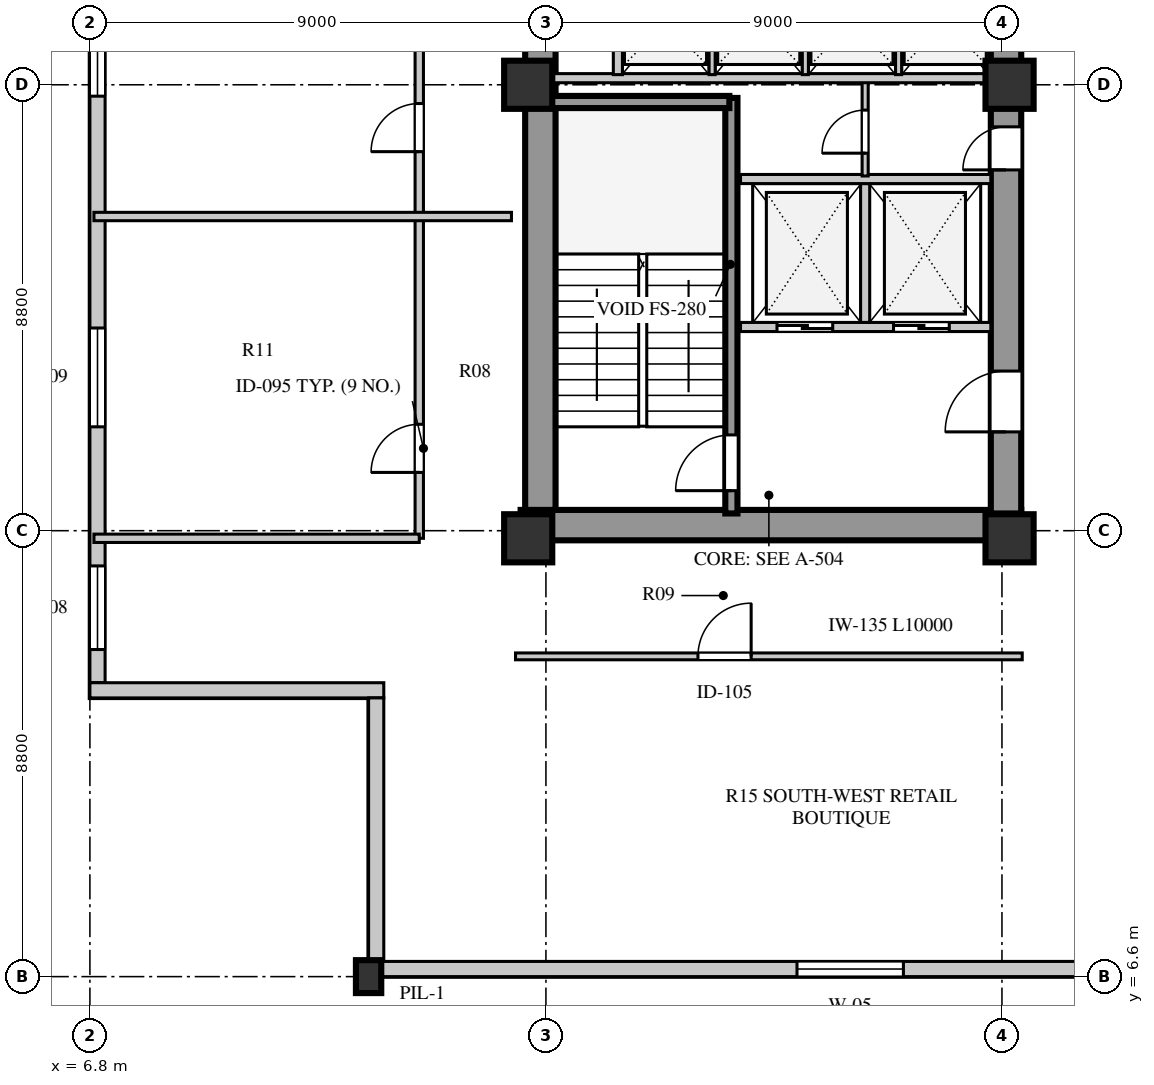
"""IFC4 building model, lengths in metres.
Left out: names, types, materials, properties, quantities, classifications, styles, units other than length and angle.
Written with IfcOpenShell. Run it as: python <this file> out.ifc"""

import sys

from ifc_helpers import new_model, si_unit, direction, frame, frame_2d, origin, origin_2d, place, context, subcontext, project, spatial, rectangle, extrude, element, fill, save


model = new_model("IFC4")
c1 = context("Model", 3, precision=1e-05, world=origin(), true_north=direction((0.0, 1.0)))
c2 = subcontext(c1, "Body", "Model", "MODEL_VIEW")
j1 = project(units=[si_unit("LENGTHUNIT", "METRE"), si_unit("PLANEANGLEUNIT", "RADIAN")], contexts=[c1])
p1 = place(None, origin())
s1 = spatial("IfcSite", under=j1, at=p1, CompositionType="ELEMENT")
p2 = place(p1, origin())
s2 = spatial("IfcBuilding", under=s1, at=p2, CompositionType="ELEMENT")
p3 = place(p2, frame((0.0, 0.0, 21.5)))
s3 = spatial("IfcBuildingStorey", under=s2, at=p3, CompositionType="ELEMENT", Elevation=21.5)
p4 = place(p3, frame((15.3, 15.51, 0.0), z_axis=(0.0, 0.0, 1.0), x_axis=(1.0, 0.0, 0.0)))
e1 = element("IfcWall", 1, at=p4, inside=s3, PredefinedType="SHEAR", context=c2, shape_type="SweptSolid", body=[
    extrude(rectangle(XDim=9.88, YDim=0.6, at=frame_2d((4.94, 0.0))), origin(), (0.0, 0.0, 1.0), 4.22),
])
p5 = place(p3, frame((15.69, 15.81, 0.0), z_axis=(0.0, 0.0, 1.0), x_axis=(0.0, 1.0, 0.0)))
e2 = element("IfcWall", 2, at=p5, inside=s3, PredefinedType="SHEAR", context=c2, shape_type="SweptSolid", body=[
    extrude(rectangle(XDim=25.63, YDim=0.6, at=frame_2d((12.815, 0.0))), origin(), (0.0, 0.0, 1.0), 4.22),
])
p6 = place(p3, frame((24.88, 15.74, 0.0), z_axis=(0.0, 0.0, 1.0), x_axis=(0.0, 1.0, 0.0)))
e3 = element("IfcWall", 3, at=p6, inside=s3, PredefinedType="SHEAR", context=c2, shape_type="SweptSolid", body=[
    extrude(rectangle(XDim=25.76, YDim=0.6, at=frame_2d((12.88, 0.0))), origin(), (0.0, 0.0, 1.0), 4.22),
])
p7 = place(p6, frame((1.61, 0.0, 0.0)))
e4 = element("IfcOpeningElement", 4, at=p7, cuts=e3, PredefinedType="OPENING", context=c2, shape_type="SweptSolid", body=[
    extrude(rectangle(XDim=1.2, YDim=2.1, at=frame_2d((0.6, 1.05))), frame((0.0, 0.31, 0.0), z_axis=(0.0, -1.0, 0.0), x_axis=(1.0, 0.0, 0.0)), (0.0, 0.0, 1.0), 0.62),
])
p8 = place(p6, frame((6.78, 0.0, 0.0)))
e5 = element("IfcOpeningElement", 5, at=p8, cuts=e3, PredefinedType="OPENING", context=c2, shape_type="SweptSolid", body=[
    extrude(rectangle(XDim=0.85, YDim=2.06, at=frame_2d((0.425, 1.03))), frame((0.0, 0.31, 0.0), z_axis=(0.0, -1.0, 0.0), x_axis=(1.0, 0.0, 0.0)), (0.0, 0.0, 1.0), 0.62),
])
p9 = place(p6, frame((12.11, 0.0, 0.0)))
e6 = element("IfcOpeningElement", 6, at=p9, cuts=e3, PredefinedType="OPENING", context=c2, shape_type="SweptSolid", body=[
    extrude(rectangle(XDim=1.5, YDim=2.12, at=frame_2d((0.75, 1.06))), frame((0.0, 0.31, 0.0), z_axis=(0.0, -1.0, 0.0), x_axis=(1.0, 0.0, 0.0)), (0.0, 0.0, 1.0), 0.62),
])
p10 = place(p6, frame((20.11, 0.0, 0.0)))
e7 = element("IfcOpeningElement", 7, at=p10, cuts=e3, PredefinedType="OPENING", context=c2, shape_type="SweptSolid", body=[
    extrude(rectangle(XDim=1.2, YDim=2.12, at=frame_2d((0.6, 1.06))), frame((0.0, 0.31, 0.0), z_axis=(0.0, -1.0, 0.0), x_axis=(1.0, 0.0, 0.0)), (0.0, 0.0, 1.0), 0.62),
])
p11 = place(p6, frame((24.01, 0.0, 0.0)))
e8 = element("IfcOpeningElement", 8, at=p11, cuts=e3, PredefinedType="OPENING", context=c2, shape_type="SweptSolid", body=[
    extrude(rectangle(XDim=0.95, YDim=2.1, at=frame_2d((0.475, 1.05))), frame((0.0, 0.31, 0.0), z_axis=(0.0, -1.0, 0.0), x_axis=(1.0, 0.0, 0.0)), (0.0, 0.0, 1.0), 0.62),
])
for number, where, z_axis, x_axis in (
    (9, (15.45, 15.25, 0.0), (0.0, 0.0, 1.0), (1.0, 0.0, 0.0)),
    (10, (15.45, 24.2, 0.0), (0.0, 0.0, 1.0), (1.0, 0.0, 0.0)),
    (11, (24.95, 15.25, 0.0), (0.0, 0.0, 1.0), (1.0, 0.0, 0.0)),
    (12, (24.95, 24.2, 0.0), (0.0, 0.0, 1.0), (1.0, 0.0, 0.0)),
):
    element("IfcColumn", number, at=place(p3, frame(where, z_axis=z_axis, x_axis=x_axis)), inside=s3, PredefinedType="COLUMN", context=c2, shape_type="SweptSolid", body=[
        extrude(rectangle(XDim=0.95, YDim=0.95, at=origin_2d()), origin(), (0.0, 0.0, 1.0), 4.22),
    ])
p12 = place(p3, frame((12.3, 6.6, 0.0), z_axis=(0.0, 0.0, 1.0), x_axis=(1.0, 0.0, 0.0)))
e13 = element("IfcColumn", 13, at=p12, inside=s3, PredefinedType="PILASTER", context=c2, shape_type="SweptSolid", body=[
    extrude(rectangle(XDim=0.5, YDim=0.65, at=origin_2d()), origin(), (0.0, 0.0, 1.0), 4.22),
])
p13 = place(p3, frame((12.3, 6.75, 0.0), z_axis=(0.0, 0.0, 1.0), x_axis=(1.0, 0.0, 0.0)))
e14 = element("IfcWall", 14, at=p13, inside=s3, PredefinedType="STANDARD", context=c2, shape_type="SweptSolid", body=[
    extrude(rectangle(XDim=34.0, YDim=0.3, at=frame_2d((17.0, 0.0))), origin(), (0.0, 0.0, 1.0), 4.22),
])
p14 = place(p13, frame((8.455, 0.0, 0.8)))
e15 = element("IfcOpeningElement", 15, at=p14, cuts=e14, PredefinedType="OPENING", context=c2, shape_type="SweptSolid", body=[
    extrude(rectangle(XDim=2.1, YDim=1.95, at=frame_2d((1.05, 0.975))), frame((0.0, 0.16, 0.0), z_axis=(0.0, -1.0, 0.0), x_axis=(1.0, 0.0, 0.0)), (0.0, 0.0, 1.0), 0.32),
])
p15 = place(p13, frame((25.72, 0.0, 0.8)))
e16 = element("IfcOpeningElement", 16, at=p15, cuts=e14, PredefinedType="OPENING", context=c2, shape_type="SweptSolid", body=[
    extrude(rectangle(XDim=1.35, YDim=1.9, at=frame_2d((0.675, 0.95))), frame((0.0, 0.16, 0.0), z_axis=(0.0, -1.0, 0.0), x_axis=(1.0, 0.0, 0.0)), (0.0, 0.0, 1.0), 0.32),
])
p16 = place(p3, frame((6.95, 44.8, 0.0), z_axis=(0.0, 0.0, 1.0), x_axis=(0.0, -1.0, 0.0)))
e17 = element("IfcWall", 17, at=p16, inside=s3, PredefinedType="STANDARD", context=c2, shape_type="SweptSolid", body=[
    extrude(rectangle(XDim=32.4, YDim=0.3, at=frame_2d((16.2, 0.0))), origin(), (0.0, 0.0, 1.0), 4.22),
])
p17 = place(p16, frame((30.095, 0.0, 0.8)))
e18 = element("IfcOpeningElement", 18, at=p17, cuts=e17, PredefinedType="OPENING", context=c2, shape_type="SweptSolid", body=[
    extrude(rectangle(XDim=1.65, YDim=1.95, at=frame_2d((0.825, 0.975))), frame((0.0, 0.16, 0.0), z_axis=(0.0, -1.0, 0.0), x_axis=(1.0, 0.0, 0.0)), (0.0, 0.0, 1.0), 0.32),
])
p18 = place(p16, frame((25.4, 0.0, 0.8)))
e19 = element("IfcOpeningElement", 19, at=p18, cuts=e17, PredefinedType="OPENING", context=c2, shape_type="SweptSolid", body=[
    extrude(rectangle(XDim=1.95, YDim=2.0, at=frame_2d((0.975, 1.0))), frame((0.0, 0.16, 0.0), z_axis=(0.0, -1.0, 0.0), x_axis=(1.0, 0.0, 0.0)), (0.0, 0.0, 1.0), 0.32),
])
p19 = place(p16, frame((18.575, 0.0, 0.8)))
e20 = element("IfcOpeningElement", 20, at=p19, cuts=e17, PredefinedType="OPENING", context=c2, shape_type="SweptSolid", body=[
    extrude(rectangle(XDim=2.25, YDim=2.0, at=frame_2d((1.125, 1.0))), frame((0.0, 0.16, 0.0), z_axis=(0.0, -1.0, 0.0), x_axis=(1.0, 0.0, 0.0)), (0.0, 0.0, 1.0), 0.32),
])
p20 = place(p16, frame((11.8, 0.0, 0.8)))
e21 = element("IfcOpeningElement", 21, at=p20, cuts=e17, PredefinedType="OPENING", context=c2, shape_type="SweptSolid", body=[
    extrude(rectangle(XDim=1.8, YDim=2.0, at=frame_2d((0.9, 1.0))), frame((0.0, 0.16, 0.0), z_axis=(0.0, -1.0, 0.0), x_axis=(1.0, 0.0, 0.0)), (0.0, 0.0, 1.0), 0.32),
])
p21 = place(p16, frame((5.275, 0.0, 0.8)))
e22 = element("IfcOpeningElement", 22, at=p21, cuts=e17, PredefinedType="OPENING", context=c2, shape_type="SweptSolid", body=[
    extrude(rectangle(XDim=1.5, YDim=2.0, at=frame_2d((0.75, 1.0))), frame((0.0, 0.16, 0.0), z_axis=(0.0, -1.0, 0.0), x_axis=(1.0, 0.0, 0.0)), (0.0, 0.0, 1.0), 0.32),
])
p22 = place(p16, frame((0.88, 0.0, 0.8)))
e23 = element("IfcOpeningElement", 23, at=p22, cuts=e17, PredefinedType="OPENING", context=c2, shape_type="SweptSolid", body=[
    extrude(rectangle(XDim=1.2, YDim=1.75, at=frame_2d((0.6, 0.875))), frame((0.0, 0.16, 0.0), z_axis=(0.0, -1.0, 0.0), x_axis=(1.0, 0.0, 0.0)), (0.0, 0.0, 1.0), 0.32),
])
p23 = place(p3, frame((6.8, 12.25, 0.0), z_axis=(0.0, 0.0, 1.0), x_axis=(1.0, 0.0, 0.0)))
e24 = element("IfcWall", 24, at=p23, inside=s3, PredefinedType="STANDARD", context=c2, shape_type="SweptSolid", body=[
    extrude(rectangle(XDim=5.8, YDim=0.3, at=frame_2d((2.9, 0.0))), origin(), (0.0, 0.0, 1.0), 4.22),
])
p24 = place(p3, frame((12.45, 12.1, 0.0), z_axis=(0.0, 0.0, 1.0), x_axis=(0.0, -1.0, 0.0)))
e25 = element("IfcWall", 25, at=p24, inside=s3, PredefinedType="STANDARD", context=c2, shape_type="SweptSolid", body=[
    extrude(rectangle(XDim=5.2, YDim=0.3, at=frame_2d((2.6, 0.0))), origin(), (0.0, 0.0, 1.0), 4.22),
])
p25 = place(p3, frame((19.46, 15.74, 0.0), z_axis=(0.0, 0.0, 1.0), x_axis=(0.0, 1.0, 0.0)))
e26 = element("IfcWall", 26, at=p25, inside=s3, PredefinedType="SHEAR", context=c2, shape_type="SweptSolid", body=[
    extrude(rectangle(XDim=8.2, YDim=0.24, at=frame_2d((4.1, 0.0))), origin(), (0.0, 0.0, 1.0), 4.5),
])
p26 = place(p25, frame((0.45, 0.0, 0.0)))
e27 = element("IfcOpeningElement", 27, at=p26, cuts=e26, PredefinedType="OPENING", context=c2, shape_type="SweptSolid", body=[
    extrude(rectangle(XDim=1.1, YDim=2.1, at=frame_2d((0.55, 1.05))), frame((0.0, 0.13, 0.0), z_axis=(0.0, -1.0, 0.0), x_axis=(1.0, 0.0, 0.0)), (0.0, 0.0, 1.0), 0.26),
])
p27 = place(p3, frame((15.9, 23.86, 0.0), z_axis=(0.0, 0.0, 1.0), x_axis=(1.0, 0.0, 0.0)))
e28 = element("IfcWall", 28, at=p27, inside=s3, PredefinedType="SHEAR", context=c2, shape_type="SweptSolid", body=[
    extrude(rectangle(XDim=3.52, YDim=0.24, at=frame_2d((1.76, 0.0))), origin(), (0.0, 0.0, 1.0), 4.5),
])
p28 = place(p3, frame((19.64, 19.42, 0.0), z_axis=(0.0, 0.0, 1.0), x_axis=(1.0, 0.0, 0.0)))
e29 = element("IfcWall", 29, at=p28, inside=s3, PredefinedType="SOLIDWALL", context=c2, shape_type="SweptSolid", body=[
    extrude(rectangle(XDim=4.94, YDim=0.18, at=frame_2d((2.47, 0.0))), origin(), (0.0, 0.0, 1.0), 4.22),
])
p29 = place(p28, frame((0.72, 0.0, 0.0)))
e30 = element("IfcOpeningElement", 30, at=p29, cuts=e29, PredefinedType="OPENING", context=c2, shape_type="SweptSolid", body=[
    extrude(rectangle(XDim=1.1, YDim=2.1, at=frame_2d((0.55, 1.05))), frame((0.0, 0.1, 0.0), z_axis=(0.0, -1.0, 0.0), x_axis=(1.0, 0.0, 0.0)), (0.0, 0.0, 1.0), 0.2),
])
p30 = place(p28, frame((3.02, 0.0, 0.0)))
e31 = element("IfcOpeningElement", 31, at=p30, cuts=e29, PredefinedType="OPENING", context=c2, shape_type="SweptSolid", body=[
    extrude(rectangle(XDim=1.1, YDim=2.1, at=frame_2d((0.55, 1.05))), frame((0.0, 0.1, 0.0), z_axis=(0.0, -1.0, 0.0), x_axis=(1.0, 0.0, 0.0)), (0.0, 0.0, 1.0), 0.2),
])
p31 = place(p3, frame((22.1, 19.51, 0.0), z_axis=(0.0, 0.0, 1.0), x_axis=(0.0, 1.0, 0.0)))
e32 = element("IfcWall", 32, at=p31, inside=s3, PredefinedType="SOLIDWALL", context=c2, shape_type="SweptSolid", body=[
    extrude(rectangle(XDim=2.74, YDim=0.18, at=frame_2d((1.37, 0.0))), origin(), (0.0, 0.0, 1.0), 4.22),
])
p32 = place(p3, frame((19.64, 22.34, 0.0), z_axis=(0.0, 0.0, 1.0), x_axis=(1.0, 0.0, 0.0)))
e33 = element("IfcWall", 33, at=p32, inside=s3, PredefinedType="SOLIDWALL", context=c2, shape_type="SweptSolid", body=[
    extrude(rectangle(XDim=4.94, YDim=0.18, at=frame_2d((2.47, 0.0))), origin(), (0.0, 0.0, 1.0), 4.22),
])
p33 = place(p3, frame((22.1, 22.4, 0.0), z_axis=(0.0, 0.0, 1.0), x_axis=(0.0, 1.0, 0.0)))
e34 = element("IfcWall", 34, at=p33, inside=s3, PredefinedType="PARTITIONING", context=c2, shape_type="SweptSolid", body=[
    extrude(rectangle(XDim=1.88, YDim=0.12, at=frame_2d((0.94, 0.0))), origin(), (0.0, 0.0, 1.0), 4.22),
])
p34 = place(p33, frame((0.45, 0.0, 0.0)))
e35 = element("IfcOpeningElement", 35, at=p34, cuts=e34, PredefinedType="OPENING", context=c2, shape_type="SweptSolid", body=[
    extrude(rectangle(XDim=0.85, YDim=2.06, at=frame_2d((0.425, 1.03))), frame((0.0, 0.07, 0.0), z_axis=(0.0, -1.0, 0.0), x_axis=(1.0, 0.0, 0.0)), (0.0, 0.0, 1.0), 0.14),
])
p35 = place(p3, frame((15.9, 24.33, 0.0), z_axis=(0.0, 0.0, 1.0), x_axis=(1.0, 0.0, 0.0)))
e36 = element("IfcWall", 36, at=p35, inside=s3, PredefinedType="SOLIDWALL", context=c2, shape_type="SweptSolid", body=[
    extrude(rectangle(XDim=8.68, YDim=0.18, at=frame_2d((4.34, 0.0))), origin(), (0.0, 0.0, 1.0), 3.42),
])
p36 = place(p3, frame((17.22, 24.4, 0.0), z_axis=(0.0, 0.0, 1.0), x_axis=(0.0, 1.0, 0.0)))
e37 = element("IfcWall", 37, at=p36, inside=s3, PredefinedType="SOLIDWALL", context=c2, shape_type="SweptSolid", body=[
    extrude(rectangle(XDim=2.05, YDim=0.18, at=frame_2d((1.025, 0.0))), origin(), (0.0, 0.0, 1.0), 4.22),
])
for number, where, z_axis, x_axis in (
    (38, (19.08, 24.4, 0.0), (0.0, 0.0, 1.0), (0.0, 1.0, 0.0)),
    (39, (20.92, 24.4, 0.0), (0.0, 0.0, 1.0), (0.0, 1.0, 0.0)),
    (40, (22.76, 24.4, 0.0), (0.0, 0.0, 1.0), (0.0, 1.0, 0.0)),
):
    element("IfcWall", number, at=place(p3, frame(where, z_axis=z_axis, x_axis=x_axis)), inside=s3, PredefinedType="PARTITIONING", context=c2, shape_type="SweptSolid", body=[
        extrude(rectangle(XDim=2.05, YDim=0.12, at=frame_2d((1.025, 0.0))), origin(), (0.0, 0.0, 1.0), 4.22),
    ])
p37 = place(p3, frame((13.3, 15.25, 0.0), z_axis=(0.0, 0.0, 1.0), x_axis=(0.0, 1.0, 0.0)))
e41 = element("IfcWall", 41, at=p37, inside=s3, PredefinedType="PARTITIONING", context=c2, shape_type="SweptSolid", body=[
    extrude(rectangle(XDim=26.7, YDim=0.165, at=frame_2d((13.35, 0.0))), origin(), (0.0, 0.0, 1.0), 4.22),
])
p38 = place(p37, frame((1.3, 0.0, 0.0)))
e42 = element("IfcOpeningElement", 42, at=p38, cuts=e41, PredefinedType="OPENING", context=c2, shape_type="SweptSolid", body=[
    extrude(rectangle(XDim=0.95, YDim=2.08, at=frame_2d((0.475, 1.04))), frame((0.0, 0.093, 0.0), z_axis=(0.0, -1.0, 0.0), x_axis=(1.0, 0.0, 0.0)), (0.0, 0.0, 1.0), 0.185),
])
p39 = place(p37, frame((7.63, 0.0, 0.0)))
e43 = element("IfcOpeningElement", 43, at=p39, cuts=e41, PredefinedType="OPENING", context=c2, shape_type="SweptSolid", body=[
    extrude(rectangle(XDim=0.95, YDim=2.08, at=frame_2d((0.475, 1.04))), frame((0.0, 0.093, 0.0), z_axis=(0.0, -1.0, 0.0), x_axis=(1.0, 0.0, 0.0)), (0.0, 0.0, 1.0), 0.185),
])
p40 = place(p37, frame((14.63, 0.0, 0.0)))
e44 = element("IfcOpeningElement", 44, at=p40, cuts=e41, PredefinedType="OPENING", context=c2, shape_type="SweptSolid", body=[
    extrude(rectangle(XDim=0.95, YDim=2.08, at=frame_2d((0.475, 1.04))), frame((0.0, 0.093, 0.0), z_axis=(0.0, -1.0, 0.0), x_axis=(1.0, 0.0, 0.0)), (0.0, 0.0, 1.0), 0.185),
])
p41 = place(p37, frame((21.63, 0.0, 0.0)))
e45 = element("IfcOpeningElement", 45, at=p41, cuts=e41, PredefinedType="OPENING", context=c2, shape_type="SweptSolid", body=[
    extrude(rectangle(XDim=0.95, YDim=2.08, at=frame_2d((0.475, 1.04))), frame((0.0, 0.093, 0.0), z_axis=(0.0, -1.0, 0.0), x_axis=(1.0, 0.0, 0.0)), (0.0, 0.0, 1.0), 0.185),
])
p42 = place(p3, frame((6.88, 15.25, 0.0), z_axis=(0.0, 0.0, 1.0), x_axis=(1.0, 0.0, 0.0)))
e46 = element("IfcWall", 46, at=p42, inside=s3, PredefinedType="PARTITIONING", context=c2, shape_type="SweptSolid", body=[
    extrude(rectangle(XDim=6.42, YDim=0.165, at=frame_2d((3.21, 0.0))), origin(), (0.0, 0.0, 1.0), 3.72),
])
p43 = place(p3, frame((15.2, 12.92, 0.0), z_axis=(0.0, 0.0, 1.0), x_axis=(1.0, 0.0, 0.0)))
e47 = element("IfcWall", 47, at=p43, inside=s3, PredefinedType="PARTITIONING", context=c2, shape_type="SweptSolid", body=[
    extrude(rectangle(XDim=10.0, YDim=0.135, at=frame_2d((5.0, 0.0))), origin(), (0.0, 0.0, 1.0), 4.22),
])
p44 = place(p43, frame((3.6, 0.0, 0.0)))
e48 = element("IfcOpeningElement", 48, at=p44, cuts=e47, PredefinedType="OPENING", context=c2, shape_type="SweptSolid", body=[
    extrude(rectangle(XDim=1.05, YDim=2.1, at=frame_2d((0.525, 1.05))), frame((0.0, 0.078, 0.0), z_axis=(0.0, -1.0, 0.0), x_axis=(1.0, 0.0, 0.0)), (0.0, 0.0, 1.0), 0.155),
])
p45 = place(p3, frame((6.88, 21.6, 0.0), z_axis=(0.0, 0.0, 1.0), x_axis=(1.0, 0.0, 0.0)))
e49 = element("IfcWall", 49, at=p45, inside=s3, PredefinedType="PARTITIONING", context=c2, shape_type="SweptSolid", body=[
    extrude(rectangle(XDim=8.24, YDim=0.165, at=frame_2d((4.12, 0.0))), origin(), (0.0, 0.0, 1.0), 4.22),
])
p46 = place(p14, origin())
e50 = element("IfcWindow", 50, at=p46, inside=s3, PartitioningType="SINGLE_PANEL", PredefinedType="WINDOW", context=c2, shape_type="SweptSolid", body=[
    extrude(rectangle(XDim=2.1, YDim=1.95, at=frame_2d((1.05, 0.975))), frame((0.0, 0.03, 0.0), z_axis=(0.0, -1.0, 0.0), x_axis=(1.0, 0.0, 0.0)), (0.0, 0.0, 1.0), 0.06),
])
fill(e15, e50)
p47 = place(p17, origin())
e51 = element("IfcWindow", 51, at=p47, inside=s3, PartitioningType="SINGLE_PANEL", PredefinedType="WINDOW", context=c2, shape_type="SweptSolid", body=[
    extrude(rectangle(XDim=1.65, YDim=1.95, at=frame_2d((0.825, 0.975))), frame((0.0, 0.03, 0.0), z_axis=(0.0, -1.0, 0.0), x_axis=(1.0, 0.0, 0.0)), (0.0, 0.0, 1.0), 0.06),
])
fill(e18, e51)
p48 = place(p18, origin())
e52 = element("IfcWindow", 52, at=p48, inside=s3, PartitioningType="SINGLE_PANEL", PredefinedType="WINDOW", context=c2, shape_type="SweptSolid", body=[
    extrude(rectangle(XDim=1.95, YDim=2.0, at=frame_2d((0.975, 1.0))), frame((0.0, 0.03, 0.0), z_axis=(0.0, -1.0, 0.0), x_axis=(1.0, 0.0, 0.0)), (0.0, 0.0, 1.0), 0.06),
])
fill(e19, e52)
p49 = place(p19, origin())
e53 = element("IfcWindow", 53, at=p49, inside=s3, PartitioningType="SINGLE_PANEL", PredefinedType="WINDOW", context=c2, shape_type="SweptSolid", body=[
    extrude(rectangle(XDim=2.25, YDim=2.0, at=frame_2d((1.125, 1.0))), frame((0.0, 0.03, 0.0), z_axis=(0.0, -1.0, 0.0), x_axis=(1.0, 0.0, 0.0)), (0.0, 0.0, 1.0), 0.06),
])
fill(e20, e53)
p50 = place(p26, origin())
e54 = element("IfcDoor", 54, at=p50, inside=s3, OperationType="SINGLE_SWING_LEFT", PredefinedType="DOOR", context=c2, shape_type="SweptSolid", body=[
    extrude(rectangle(XDim=1.1, YDim=2.1, at=frame_2d((0.55, 1.05))), frame((0.0, 0.025, 0.0), z_axis=(0.0, -1.0, 0.0), x_axis=(1.0, 0.0, 0.0)), (0.0, 0.0, 1.0), 0.05),
])
fill(e27, e54)
p51 = place(p29, origin())
e55 = element("IfcDoor", 55, at=p51, inside=s3, OperationType="DOUBLE_DOOR_SLIDING", PredefinedType="DOOR", context=c2, shape_type="SweptSolid", body=[
    extrude(rectangle(XDim=1.1, YDim=2.1, at=frame_2d((0.55, 1.05))), frame((0.0, 0.025, 0.0), z_axis=(0.0, -1.0, 0.0), x_axis=(1.0, 0.0, 0.0)), (0.0, 0.0, 1.0), 0.05),
])
fill(e30, e55)
p52 = place(p30, origin())
e56 = element("IfcDoor", 56, at=p52, inside=s3, OperationType="DOUBLE_DOOR_SLIDING", PredefinedType="DOOR", context=c2, shape_type="SweptSolid", body=[
    extrude(rectangle(XDim=1.1, YDim=2.1, at=frame_2d((0.55, 1.05))), frame((0.0, 0.025, 0.0), z_axis=(0.0, -1.0, 0.0), x_axis=(1.0, 0.0, 0.0)), (0.0, 0.0, 1.0), 0.05),
])
fill(e31, e56)
p53 = place(p7, frame((1.2, 0.0, 0.0), z_axis=(0.0, 0.0, 1.0), x_axis=(-1.0, 0.0, 0.0)))
e57 = element("IfcDoor", 57, at=p53, inside=s3, OperationType="SINGLE_SWING_RIGHT", PredefinedType="DOOR", context=c2, shape_type="SweptSolid", body=[
    extrude(rectangle(XDim=1.2, YDim=2.1, at=frame_2d((0.6, 1.05))), frame((0.0, 0.025, 0.0), z_axis=(0.0, -1.0, 0.0), x_axis=(1.0, 0.0, 0.0)), (0.0, 0.0, 1.0), 0.05),
])
fill(e4, e57)
p54 = place(p34, origin())
e58 = element("IfcDoor", 58, at=p54, inside=s3, OperationType="SINGLE_SWING_LEFT", PredefinedType="DOOR", context=c2, shape_type="SweptSolid", body=[
    extrude(rectangle(XDim=0.85, YDim=2.06, at=frame_2d((0.425, 1.03))), frame((0.0, 0.025, 0.0), z_axis=(0.0, -1.0, 0.0), x_axis=(1.0, 0.0, 0.0)), (0.0, 0.0, 1.0), 0.05),
])
fill(e35, e58)
p55 = place(p8, frame((0.85, 0.0, 0.0), z_axis=(0.0, 0.0, 1.0), x_axis=(-1.0, 0.0, 0.0)))
e59 = element("IfcDoor", 59, at=p55, inside=s3, OperationType="SINGLE_SWING_RIGHT", PredefinedType="DOOR", context=c2, shape_type="SweptSolid", body=[
    extrude(rectangle(XDim=0.85, YDim=2.06, at=frame_2d((0.425, 1.03))), frame((0.0, 0.025, 0.0), z_axis=(0.0, -1.0, 0.0), x_axis=(1.0, 0.0, 0.0)), (0.0, 0.0, 1.0), 0.05),
])
fill(e5, e59)
p56 = place(p38, origin())
e60 = element("IfcDoor", 60, at=p56, inside=s3, OperationType="SINGLE_SWING_LEFT", PredefinedType="DOOR", context=c2, shape_type="SweptSolid", body=[
    extrude(rectangle(XDim=0.95, YDim=2.08, at=frame_2d((0.475, 1.04))), frame((0.0, 0.025, 0.0), z_axis=(0.0, -1.0, 0.0), x_axis=(1.0, 0.0, 0.0)), (0.0, 0.0, 1.0), 0.05),
])
fill(e42, e60)
p57 = place(p39, origin())
e61 = element("IfcDoor", 61, at=p57, inside=s3, OperationType="SINGLE_SWING_LEFT", PredefinedType="DOOR", context=c2, shape_type="SweptSolid", body=[
    extrude(rectangle(XDim=0.95, YDim=2.08, at=frame_2d((0.475, 1.04))), frame((0.0, 0.025, 0.0), z_axis=(0.0, -1.0, 0.0), x_axis=(1.0, 0.0, 0.0)), (0.0, 0.0, 1.0), 0.05),
])
fill(e43, e61)
p58 = place(p44, frame((1.05, 0.0, 0.0), z_axis=(0.0, 0.0, 1.0), x_axis=(-1.0, 0.0, 0.0)))
e62 = element("IfcDoor", 62, at=p58, inside=s3, OperationType="SINGLE_SWING_LEFT", PredefinedType="DOOR", context=c2, shape_type="SweptSolid", body=[
    extrude(rectangle(XDim=1.05, YDim=2.1, at=frame_2d((0.525, 1.05))), frame((0.0, 0.025, 0.0), z_axis=(0.0, -1.0, 0.0), x_axis=(1.0, 0.0, 0.0)), (0.0, 0.0, 1.0), 0.05),
])
fill(e48, e62)
save(model, sys.argv[1])
